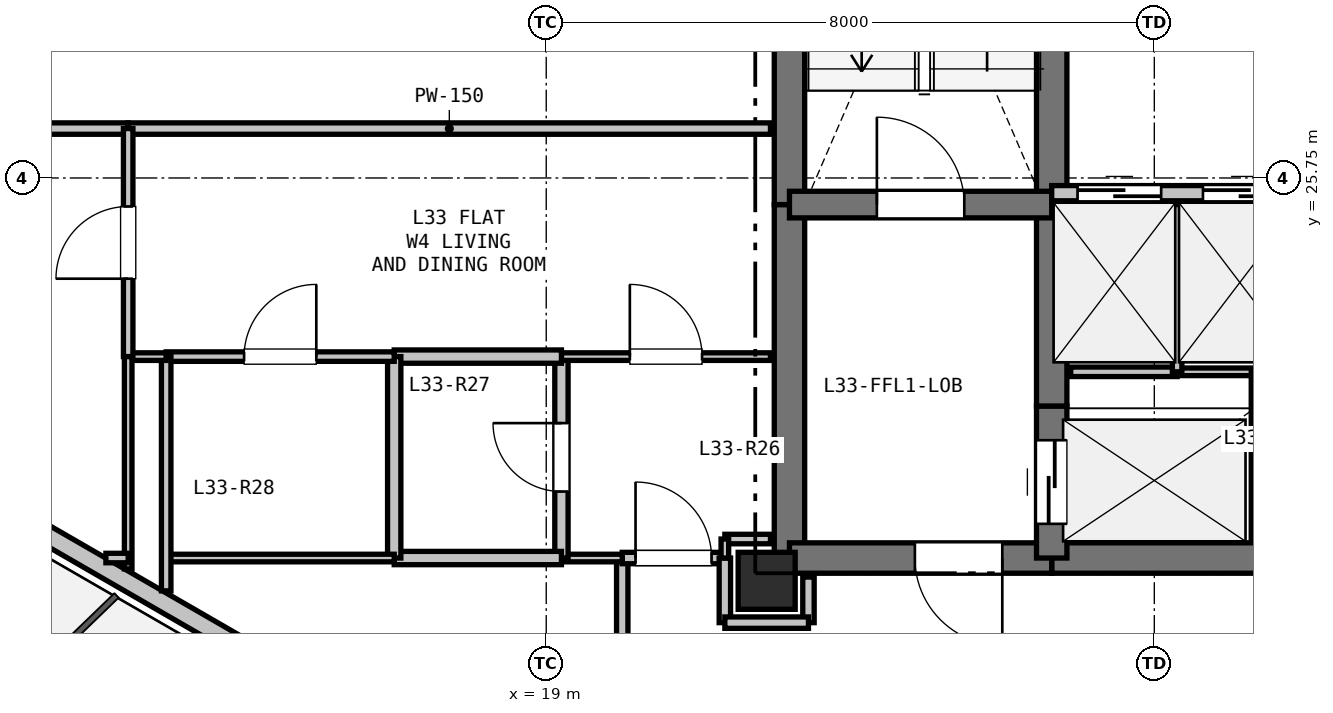
"""IFC4 building model, lengths in metres.
Left out: names, types, materials, properties, quantities, classifications, styles, units other than length and angle.
Written with IfcOpenShell. Run it as: python <this file> out.ifc"""

import sys

from ifc_helpers import new_model, si_unit, direction, frame, frame_2d, origin, origin_2d, place, context, subcontext, project, spatial, rectangle, extrude, element, fill, save


model = new_model("IFC4")
c1 = context("Model", 3, precision=1e-05, world=origin(), true_north=direction((0.0, 1.0)))
c2 = subcontext(c1, "Body", "Model", "MODEL_VIEW")
j1 = project(units=[si_unit("LENGTHUNIT", "METRE"), si_unit("PLANEANGLEUNIT", "RADIAN")], contexts=[c1])
p1 = place(None, origin())
s1 = spatial("IfcSite", under=j1, at=p1, CompositionType="ELEMENT")
p2 = place(p1, origin())
s2 = spatial("IfcBuilding", under=s1, at=p2, CompositionType="ELEMENT")
p3 = place(p2, frame((0.0, 0.0, 121.2)))
s3 = spatial("IfcBuildingStorey", under=s2, at=p3, CompositionType="ELEMENT", Elevation=121.2)
p4 = place(p3, frame((21.9, 20.45, 0.0), z_axis=(0.0, 0.0, 1.0), x_axis=(1.0, 0.0, 0.0)))
e1 = element("IfcColumn", 1, at=p4, inside=s3, PredefinedType="COLUMN", context=c2, shape_type="SweptSolid", body=[
    extrude(rectangle(XDim=0.75, YDim=0.75, at=origin_2d()), origin(), (0.0, 0.0, 1.0), 3.3),
])
p5 = place(p3, frame((16.378, 18.773, 0.0), z_axis=(0.0, 0.0, 1.0), x_axis=(-0.866027848477, 0.499995765644, 0.0)))
e2 = element("IfcWall", 2, at=p5, inside=s3, PredefinedType="SOLIDWALL", context=c2, shape_type="SweptSolid", body=[
    extrude(rectangle(XDim=11.186, YDim=0.25, at=frame_2d((5.593, 0.0))), origin(), (0.0, 0.0, 1.0), 2.68),
])
p6 = place(p5, frame((6.757, 0.0, 0.9)))
e3 = element("IfcOpeningElement", 3, at=p6, cuts=e2, PredefinedType="OPENING", context=c2, shape_type="SweptSolid", body=[
    extrude(rectangle(XDim=1.2, YDim=1.4, at=frame_2d((0.6, 0.7))), frame((0.0, 0.135, 0.0), z_axis=(0.0, -1.0, 0.0), x_axis=(1.0, 0.0, 0.0)), (0.0, 0.0, 1.0), 0.27),
])
p7 = place(p3, frame((22.2, 20.75, 0.0), z_axis=(0.0, 0.0, 1.0), x_axis=(0.0, 1.0, 0.0)))
e4 = element("IfcWall", 4, at=p7, inside=s3, PredefinedType="SHEAR", context=c2, shape_type="SweptSolid", body=[
    extrude(rectangle(XDim=4.65, YDim=0.4, at=frame_2d((2.325, 0.0))), origin(), (0.0, 0.0, 1.0), 3.06),
])
p8 = place(p3, frame((22.2, 25.4, 0.0), z_axis=(0.0, 0.0, 1.0), x_axis=(0.0, 1.0, 0.0)))
e5 = element("IfcWall", 5, at=p8, inside=s3, PredefinedType="SHEAR", context=c2, shape_type="SweptSolid", body=[
    extrude(rectangle(XDim=7.35, YDim=0.4, at=frame_2d((3.675, 0.0))), origin(), (0.0, 0.0, 1.0), 3.06),
])
p9 = place(p3, frame((28.35, 20.75, 0.0), z_axis=(0.0, 0.0, 1.0), x_axis=(-1.0, 0.0, 0.0)))
e6 = element("IfcWall", 6, at=p9, inside=s3, PredefinedType="SHEAR", context=c2, shape_type="SweptSolid", body=[
    extrude(rectangle(XDim=2.7, YDim=0.4, at=frame_2d((1.35, 0.0))), origin(), (0.0, 0.0, 1.0), 3.06),
])
p10 = place(p3, frame((25.65, 20.75, 0.0), z_axis=(0.0, 0.0, 1.0), x_axis=(-1.0, 0.0, 0.0)))
e7 = element("IfcWall", 7, at=p10, inside=s3, PredefinedType="SHEAR", context=c2, shape_type="SweptSolid", body=[
    extrude(rectangle(XDim=3.45, YDim=0.4, at=frame_2d((1.725, 0.0))), origin(), (0.0, 0.0, 1.0), 3.06),
])
p11 = place(p10, frame((0.65, 0.0, 0.0)))
e8 = element("IfcOpeningElement", 8, at=p11, cuts=e7, PredefinedType="OPENING", context=c2, shape_type="SweptSolid", body=[
    extrude(rectangle(XDim=1.15, YDim=2.15, at=frame_2d((0.575, 1.075))), frame((0.0, 0.21, 0.0), z_axis=(0.0, -1.0, 0.0), x_axis=(1.0, 0.0, 0.0)), (0.0, 0.0, 1.0), 0.42),
])
p12 = place(p3, frame((25.65, 20.75, 0.0), z_axis=(0.0, 0.0, 1.0), x_axis=(0.0, 1.0, 0.0)))
e9 = element("IfcWall", 9, at=p12, inside=s3, PredefinedType="SHEAR", context=c2, shape_type="SweptSolid", body=[
    extrude(rectangle(XDim=2.0, YDim=0.4, at=frame_2d((1.0, 0.0))), origin(), (0.0, 0.0, 1.0), 3.06),
])
p13 = place(p12, frame((0.45, 0.0, 0.0)))
e10 = element("IfcOpeningElement", 10, at=p13, cuts=e9, PredefinedType="OPENING", context=c2, shape_type="SweptSolid", body=[
    extrude(rectangle(XDim=1.1, YDim=2.15, at=frame_2d((0.55, 1.075))), frame((0.0, 0.21, 0.0), z_axis=(0.0, -1.0, 0.0), x_axis=(1.0, 0.0, 0.0)), (0.0, 0.0, 1.0), 0.42),
])
p14 = place(p3, frame((25.65, 22.75, 0.0), z_axis=(0.0, 0.0, 1.0), x_axis=(0.0, 1.0, 0.0)))
e11 = element("IfcWall", 11, at=p14, inside=s3, PredefinedType="SHEAR", context=c2, shape_type="SweptSolid", body=[
    extrude(rectangle(XDim=2.8, YDim=0.4, at=frame_2d((1.4, 0.0))), origin(), (0.0, 0.0, 1.0), 3.06),
])
p15 = place(p3, frame((25.65, 25.55, 0.0), z_axis=(0.0, 0.0, 1.0), x_axis=(0.0, 1.0, 0.0)))
e12 = element("IfcWall", 12, at=p15, inside=s3, PredefinedType="SHEAR", context=c2, shape_type="SweptSolid", body=[
    extrude(rectangle(XDim=2.4, YDim=0.4, at=frame_2d((1.2, 0.0))), origin(), (0.0, 0.0, 1.0), 3.06),
])
p16 = place(p3, frame((22.2, 25.4, 0.0), z_axis=(0.0, 0.0, 1.0), x_axis=(1.0, 0.0, 0.0)))
e13 = element("IfcWall", 13, at=p16, inside=s3, PredefinedType="SHEAR", context=c2, shape_type="SweptSolid", body=[
    extrude(rectangle(XDim=3.45, YDim=0.35, at=frame_2d((1.725, 0.0))), origin(), (0.0, 0.0, 1.0), 3.06),
])
p17 = place(p16, frame((1.15, 0.0, 0.0)))
e14 = element("IfcOpeningElement", 14, at=p17, cuts=e13, PredefinedType="OPENING", context=c2, shape_type="SweptSolid", body=[
    extrude(rectangle(XDim=1.15, YDim=2.15, at=frame_2d((0.575, 1.075))), frame((0.0, 0.185, 0.0), z_axis=(0.0, -1.0, 0.0), x_axis=(1.0, 0.0, 0.0)), (0.0, 0.0, 1.0), 0.37),
])
p18 = place(p3, frame((25.65, 25.55, 0.0), z_axis=(0.0, 0.0, 1.0), x_axis=(1.0, 0.0, 0.0)))
e15 = element("IfcWall", 15, at=p18, inside=s3, PredefinedType="PARTITIONING", context=c2, shape_type="SweptSolid", body=[
    extrude(rectangle(XDim=4.95, YDim=0.2, at=frame_2d((2.475, 0.0))), origin(), (0.0, 0.0, 1.0), 3.06),
])
p19 = place(p18, frame((0.34, 0.0, 0.0)))
e16 = element("IfcOpeningElement", 16, at=p19, cuts=e15, PredefinedType="OPENING", context=c2, shape_type="SweptSolid", body=[
    extrude(rectangle(XDim=1.1, YDim=2.15, at=frame_2d((0.55, 1.075))), frame((0.0, 0.11, 0.0), z_axis=(0.0, -1.0, 0.0), x_axis=(1.0, 0.0, 0.0)), (0.0, 0.0, 1.0), 0.22),
])
p20 = place(p18, frame((1.99, 0.0, 0.0)))
e17 = element("IfcOpeningElement", 17, at=p20, cuts=e15, PredefinedType="OPENING", context=c2, shape_type="SweptSolid", body=[
    extrude(rectangle(XDim=1.1, YDim=2.15, at=frame_2d((0.55, 1.075))), frame((0.0, 0.11, 0.0), z_axis=(0.0, -1.0, 0.0), x_axis=(1.0, 0.0, 0.0)), (0.0, 0.0, 1.0), 0.22),
])
p21 = place(p18, frame((3.64, 0.0, 0.0)))
e18 = element("IfcOpeningElement", 18, at=p21, cuts=e15, PredefinedType="OPENING", context=c2, shape_type="SweptSolid", body=[
    extrude(rectangle(XDim=1.1, YDim=2.15, at=frame_2d((0.55, 1.075))), frame((0.0, 0.11, 0.0), z_axis=(0.0, -1.0, 0.0), x_axis=(1.0, 0.0, 0.0)), (0.0, 0.0, 1.0), 0.22),
])
p22 = place(p3, frame((25.9, 23.2, 0.0), z_axis=(0.0, 0.0, 1.0), x_axis=(1.0, 0.0, 0.0)))
e19 = element("IfcWall", 19, at=p22, inside=s3, PredefinedType="PARTITIONING", context=c2, shape_type="SweptSolid", body=[
    extrude(rectangle(XDim=1.4, YDim=0.125, at=frame_2d((0.7, 0.0))), origin(), (0.0, 0.0, 1.0), 3.06),
])
p23 = place(p3, frame((27.3, 23.2, 0.0), z_axis=(0.0, 0.0, 1.0), x_axis=(1.0, 0.0, 0.0)))
e20 = element("IfcWall", 20, at=p23, inside=s3, PredefinedType="PARTITIONING", context=c2, shape_type="SweptSolid", body=[
    extrude(rectangle(XDim=1.05, YDim=0.1, at=frame_2d((0.525, 0.0))), origin(), (0.0, 0.0, 1.0), 3.06),
])
p24 = place(p3, frame((28.35, 23.2, 0.0), z_axis=(0.0, 0.0, 1.0), x_axis=(0.0, -1.0, 0.0)))
e21 = element("IfcWall", 21, at=p24, inside=s3, PredefinedType="PARTITIONING", context=c2, shape_type="SweptSolid", body=[
    extrude(rectangle(XDim=2.2, YDim=0.15, at=frame_2d((1.1, 0.0))), origin(), (0.0, 0.0, 1.0), 3.06),
])
p25 = place(p3, frame((27.3, 25.4, 0.0), z_axis=(0.0, 0.0, 1.0), x_axis=(0.0, -1.0, 0.0)))
e22 = element("IfcWall", 22, at=p25, inside=s3, PredefinedType="PARTITIONING", context=c2, shape_type="SweptSolid", body=[
    extrude(rectangle(XDim=2.2, YDim=0.125, at=frame_2d((1.1, 0.0))), origin(), (0.0, 0.0, 1.0), 3.06),
])
p26 = place(p3, frame((22.45, 19.9, 0.0), z_axis=(0.0, 0.0, 1.0), x_axis=(0.0, 1.0, 0.0)))
e23 = element("IfcWall", 23, at=p26, inside=s3, PredefinedType="PARTITIONING", context=c2, shape_type="SweptSolid", body=[
    extrude(rectangle(XDim=0.6, YDim=0.15, at=frame_2d((0.3, 0.0))), origin(), (0.0, 0.0, 1.0), 2.433),
])
p27 = place(p3, frame((20.0, 18.15, 0.0), z_axis=(0.0, 0.0, 1.0), x_axis=(0.0, 1.0, 0.0)))
e24 = element("IfcWall", 24, at=p27, inside=s3, PredefinedType="PARTITIONING", context=c2, shape_type="SweptSolid", body=[
    extrude(rectangle(XDim=2.6, YDim=0.15, at=frame_2d((1.3, 0.0))), origin(), (0.0, 0.0, 1.0), 3.06),
])
p28 = place(p3, frame((20.0, 20.75, 0.0), z_axis=(0.0, 0.0, 1.0), x_axis=(1.0, 0.0, 0.0)))
e25 = element("IfcWall", 25, at=p28, inside=s3, PredefinedType="PARTITIONING", context=c2, shape_type="SweptSolid", body=[
    extrude(rectangle(XDim=1.35, YDim=0.15, at=frame_2d((0.675, 0.0))), origin(), (0.0, 0.0, 1.0), 2.433),
])
p29 = place(p28, frame((0.175, 0.0, 0.0)))
e26 = element("IfcOpeningElement", 26, at=p29, cuts=e25, PredefinedType="OPENING", context=c2, shape_type="SweptSolid", body=[
    extrude(rectangle(XDim=1.0, YDim=2.15, at=frame_2d((0.5, 1.075))), frame((0.0, 0.085, 0.0), z_axis=(0.0, -1.0, 0.0), x_axis=(1.0, 0.0, 0.0)), (0.0, 0.0, 1.0), 0.17),
])
p30 = place(p3, frame((21.35, 20.75, 0.0), z_axis=(0.0, 0.0, 1.0), x_axis=(0.0, -1.0, 0.0)))
e27 = element("IfcWall", 27, at=p30, inside=s3, PredefinedType="PARTITIONING", context=c2, shape_type="SweptSolid", body=[
    extrude(rectangle(XDim=0.85, YDim=0.15, at=frame_2d((0.425, 0.0))), origin(), (0.0, 0.0, 1.0), 2.433),
])
p31 = place(p3, frame((21.35, 19.9, 0.0), z_axis=(0.0, 0.0, 1.0), x_axis=(1.0, 0.0, 0.0)))
e28 = element("IfcWall", 28, at=p31, inside=s3, PredefinedType="PARTITIONING", context=c2, shape_type="SweptSolid", body=[
    extrude(rectangle(XDim=1.1, YDim=0.15, at=frame_2d((0.55, 0.0))), origin(), (0.0, 0.0, 1.0), 2.433),
])
p32 = place(p3, frame((20.0, 20.75, 0.0), z_axis=(0.0, 0.0, 1.0), x_axis=(-1.0, 0.0, 0.0)))
e29 = element("IfcWall", 29, at=p32, inside=s3, PredefinedType="PARTITIONING", context=c2, shape_type="SweptSolid", body=[
    extrude(rectangle(XDim=0.8, YDim=0.1, at=frame_2d((0.4, 0.0))), origin(), (0.0, 0.0, 1.0), 3.06),
])
p33 = place(p3, frame((19.2, 20.75, 0.0), z_axis=(0.0, 0.0, 1.0), x_axis=(0.0, 1.0, 0.0)))
e30 = element("IfcWall", 30, at=p33, inside=s3, PredefinedType="PLUMBINGWALL", context=c2, shape_type="SweptSolid", body=[
    extrude(rectangle(XDim=2.65, YDim=0.175, at=frame_2d((1.325, 0.0))), origin(), (0.0, 0.0, 1.0), 2.433),
])
p34 = place(p33, frame((0.875, 0.0, 0.0)))
e31 = element("IfcOpeningElement", 31, at=p34, cuts=e30, PredefinedType="OPENING", context=c2, shape_type="SweptSolid", body=[
    extrude(rectangle(XDim=0.9, YDim=2.1, at=frame_2d((0.45, 1.05))), frame((0.0, 0.097, 0.0), z_axis=(0.0, -1.0, 0.0), x_axis=(1.0, 0.0, 0.0)), (0.0, 0.0, 1.0), 0.195),
])
p35 = place(p3, frame((19.2, 23.4, 0.0), z_axis=(0.0, 0.0, 1.0), x_axis=(1.0, 0.0, 0.0)))
e32 = element("IfcWall", 32, at=p35, inside=s3, PredefinedType="PARTITIONING", context=c2, shape_type="SweptSolid", body=[
    extrude(rectangle(XDim=2.75, YDim=0.1, at=frame_2d((1.375, 0.0))), origin(), (0.0, 0.0, 1.0), 2.508),
])
p36 = place(p35, frame((0.9, 0.0, 0.0)))
e33 = element("IfcOpeningElement", 33, at=p36, cuts=e32, PredefinedType="OPENING", context=c2, shape_type="SweptSolid", body=[
    extrude(rectangle(XDim=0.95, YDim=2.1, at=frame_2d((0.475, 1.05))), frame((0.0, 0.06, 0.0), z_axis=(0.0, -1.0, 0.0), x_axis=(1.0, 0.0, 0.0)), (0.0, 0.0, 1.0), 0.12),
])
p37 = place(p3, frame((21.95, 21.0, 0.0), z_axis=(0.0, 0.0, 1.0), x_axis=(-1.0, 0.0, 0.0)))
e34 = element("IfcWall", 34, at=p37, inside=s3, PredefinedType="PARTITIONING", context=c2, shape_type="SweptSolid", body=[
    extrude(rectangle(XDim=0.6, YDim=0.125, at=frame_2d((0.3, 0.0))), origin(), (0.0, 0.0, 1.0), 2.508),
])
p38 = place(p3, frame((21.35, 21.0, 0.0), z_axis=(0.0, 0.0, 1.0), x_axis=(0.0, -1.0, 0.0)))
e35 = element("IfcWall", 35, at=p38, inside=s3, PredefinedType="PARTITIONING", context=c2, shape_type="SweptSolid", body=[
    extrude(rectangle(XDim=0.25, YDim=0.1, at=frame_2d((0.125, 0.0))), origin(), (0.0, 0.0, 1.0), 3.06),
])
for number, where, z_axis, x_axis in (
    (36, (17.0, 23.4, 0.0), (0.0, 0.0, 1.0), (1.0, 0.0, 0.0)),
    (37, (19.2, 20.75, 0.0), (0.0, 0.0, 1.0), (-1.0, 0.0, 0.0)),
):
    element("IfcWall", number, at=place(p3, frame(where, z_axis=z_axis, x_axis=x_axis)), inside=s3, PredefinedType="PLUMBINGWALL", context=c2, shape_type="SweptSolid", body=[
        extrude(rectangle(XDim=2.2, YDim=0.175, at=frame_2d((1.1, 0.0))), origin(), (0.0, 0.0, 1.0), 3.06),
    ])
p39 = place(p3, frame((17.0, 20.75, 0.0), z_axis=(0.0, 0.0, 1.0), x_axis=(0.0, 1.0, 0.0)))
e38 = element("IfcWall", 38, at=p39, inside=s3, PredefinedType="PLUMBINGWALL", context=c2, shape_type="SweptSolid", body=[
    extrude(rectangle(XDim=2.65, YDim=0.175, at=frame_2d((1.325, 0.0))), origin(), (0.0, 0.0, 1.0), 2.433),
])
p40 = place(p3, frame((14.0, 23.4, 0.0), z_axis=(0.0, 0.0, 1.0), x_axis=(1.0, 0.0, 0.0)))
e39 = element("IfcWall", 39, at=p40, inside=s3, PredefinedType="PARTITIONING", context=c2, shape_type="SweptSolid", body=[
    extrude(rectangle(XDim=3.0, YDim=0.125, at=frame_2d((1.5, 0.0))), origin(), (0.0, 0.0, 1.0), 3.06),
])
p41 = place(p40, frame((1.025, 0.0, 0.0)))
e40 = element("IfcOpeningElement", 40, at=p41, cuts=e39, PredefinedType="OPENING", context=c2, shape_type="SweptSolid", body=[
    extrude(rectangle(XDim=0.95, YDim=2.1, at=frame_2d((0.475, 1.05))), frame((0.0, 0.073, 0.0), z_axis=(0.0, -1.0, 0.0), x_axis=(1.0, 0.0, 0.0)), (0.0, 0.0, 1.0), 0.145),
])
p42 = place(p3, frame((17.0, 20.75, 0.0), z_axis=(0.0, 0.0, 1.0), x_axis=(-1.0, 0.0, 0.0)))
e41 = element("IfcWall", 41, at=p42, inside=s3, PredefinedType="PARTITIONING", context=c2, shape_type="SweptSolid", body=[
    extrude(rectangle(XDim=3.0, YDim=0.1, at=frame_2d((1.5, 0.0))), origin(), (0.0, 0.0, 1.0), 2.365),
])
p43 = place(p3, frame((14.0, 20.318, 0.0), z_axis=(0.0, 0.0, 1.0), x_axis=(0.0, 1.0, 0.0)))
e42 = element("IfcWall", 42, at=p43, inside=s3, PredefinedType="PARTITIONING", context=c2, shape_type="SweptSolid", body=[
    extrude(rectangle(XDim=3.082, YDim=0.125, at=frame_2d((1.541, 0.0))), origin(), (0.0, 0.0, 1.0), 2.365),
])
p44 = place(p3, frame((21.95, 26.4, 0.0), z_axis=(0.0, 0.0, 1.0), x_axis=(-1.0, 0.0, 0.0)))
e43 = element("IfcWall", 43, at=p44, inside=s3, PredefinedType="PARTITIONING", context=c2, shape_type="SweptSolid", body=[
    extrude(rectangle(XDim=8.45, YDim=0.15, at=frame_2d((4.225, 0.0))), origin(), (0.0, 0.0, 1.0), 2.508),
])
p45 = place(p3, frame((13.5, 26.4, 0.0), z_axis=(0.0, 0.0, 1.0), x_axis=(-1.0, 0.0, 0.0)))
e44 = element("IfcWall", 44, at=p45, inside=s3, PredefinedType="PARTITIONING", context=c2, shape_type="SweptSolid", body=[
    extrude(rectangle(XDim=6.791, YDim=0.15, at=frame_2d((3.396, 0.0))), origin(), (0.0, 0.0, 1.0), 2.725),
])
p46 = place(p3, frame((14.0, 23.4, 0.0), z_axis=(0.0, 0.0, 1.0), x_axis=(-1.0, 0.0, 0.0)))
e45 = element("IfcWall", 45, at=p46, inside=s3, PredefinedType="PARTITIONING", context=c2, shape_type="SweptSolid", body=[
    extrude(rectangle(XDim=0.5, YDim=0.1, at=frame_2d((0.25, 0.0))), origin(), (0.0, 0.0, 1.0), 3.06),
])
p47 = place(p3, frame((13.5, 23.4, 0.0), z_axis=(0.0, 0.0, 1.0), x_axis=(0.0, 1.0, 0.0)))
e46 = element("IfcWall", 46, at=p47, inside=s3, PredefinedType="PARTITIONING", context=c2, shape_type="SweptSolid", body=[
    extrude(rectangle(XDim=3.0, YDim=0.125, at=frame_2d((1.5, 0.0))), origin(), (0.0, 0.0, 1.0), 3.06),
])
p48 = place(p47, frame((1.025, 0.0, 0.0)))
e47 = element("IfcOpeningElement", 47, at=p48, cuts=e46, PredefinedType="OPENING", context=c2, shape_type="SweptSolid", body=[
    extrude(rectangle(XDim=0.95, YDim=2.1, at=frame_2d((0.475, 1.05))), frame((0.0, 0.073, 0.0), z_axis=(0.0, -1.0, 0.0), x_axis=(1.0, 0.0, 0.0)), (0.0, 0.0, 1.0), 0.145),
])
p49 = place(p3, frame((13.5, 23.4, 0.0), z_axis=(0.0, 0.0, 1.0), x_axis=(0.0, -1.0, 0.0)))
e48 = element("IfcWall", 48, at=p49, inside=s3, PredefinedType="PARTITIONING", context=c2, shape_type="SweptSolid", body=[
    extrude(rectangle(XDim=2.793, YDim=0.1, at=frame_2d((1.396, 0.0))), origin(), (0.0, 0.0, 1.0), 2.365),
])
p50 = place(p3, frame((13.5, 20.75, 0.0), z_axis=(0.0, 0.0, 1.0), x_axis=(-1.0, 0.0, 0.0)))
e49 = element("IfcWall", 49, at=p50, inside=s3, PredefinedType="PARTITIONING", context=c2, shape_type="SweptSolid", body=[
    extrude(rectangle(XDim=0.293, YDim=0.125, at=frame_2d((0.146, 0.0))), origin(), (0.0, 0.0, 1.0), 3.06),
])
p51 = place(p19, origin())
e50 = element("IfcDoor", 50, at=p51, inside=s3, OperationType="SLIDING_TO_LEFT", PredefinedType="DOOR", context=c2, shape_type="SweptSolid", body=[
    extrude(rectangle(XDim=1.1, YDim=2.15, at=frame_2d((0.55, 1.075))), frame((0.0, 0.025, 0.0), z_axis=(0.0, -1.0, 0.0), x_axis=(1.0, 0.0, 0.0)), (0.0, 0.0, 1.0), 0.05),
])
fill(e16, e50)
p52 = place(p20, origin())
e51 = element("IfcDoor", 51, at=p52, inside=s3, OperationType="SLIDING_TO_LEFT", PredefinedType="DOOR", context=c2, shape_type="SweptSolid", body=[
    extrude(rectangle(XDim=1.1, YDim=2.15, at=frame_2d((0.55, 1.075))), frame((0.0, 0.025, 0.0), z_axis=(0.0, -1.0, 0.0), x_axis=(1.0, 0.0, 0.0)), (0.0, 0.0, 1.0), 0.05),
])
fill(e17, e51)
p53 = place(p13, origin())
e52 = element("IfcDoor", 52, at=p53, inside=s3, OperationType="SLIDING_TO_LEFT", PredefinedType="DOOR", context=c2, shape_type="SweptSolid", body=[
    extrude(rectangle(XDim=1.1, YDim=2.15, at=frame_2d((0.55, 1.075))), frame((0.0, 0.025, 0.0), z_axis=(0.0, -1.0, 0.0), x_axis=(1.0, 0.0, 0.0)), (0.0, 0.0, 1.0), 0.05),
])
fill(e10, e52)
p54 = place(p17, origin())
e53 = element("IfcDoor", 53, at=p54, inside=s3, OperationType="SINGLE_SWING_LEFT", PredefinedType="DOOR", context=c2, shape_type="SweptSolid", body=[
    extrude(rectangle(XDim=1.15, YDim=2.15, at=frame_2d((0.575, 1.075))), frame((0.0, 0.025, 0.0), z_axis=(0.0, -1.0, 0.0), x_axis=(1.0, 0.0, 0.0)), (0.0, 0.0, 1.0), 0.05),
])
fill(e14, e53)
p55 = place(p11, origin())
e54 = element("IfcDoor", 54, at=p55, inside=s3, OperationType="SINGLE_SWING_LEFT", PredefinedType="DOOR", context=c2, shape_type="SweptSolid", body=[
    extrude(rectangle(XDim=1.15, YDim=2.15, at=frame_2d((0.575, 1.075))), frame((0.0, 0.025, 0.0), z_axis=(0.0, -1.0, 0.0), x_axis=(1.0, 0.0, 0.0)), (0.0, 0.0, 1.0), 0.05),
])
fill(e8, e54)
p56 = place(p29, origin())
e55 = element("IfcDoor", 55, at=p56, inside=s3, OperationType="SINGLE_SWING_LEFT", PredefinedType="DOOR", context=c2, shape_type="SweptSolid", body=[
    extrude(rectangle(XDim=1.0, YDim=2.15, at=frame_2d((0.5, 1.075))), frame((0.0, 0.025, 0.0), z_axis=(0.0, -1.0, 0.0), x_axis=(1.0, 0.0, 0.0)), (0.0, 0.0, 1.0), 0.05),
])
fill(e26, e55)
p57 = place(p34, origin())
e56 = element("IfcDoor", 56, at=p57, inside=s3, OperationType="SINGLE_SWING_RIGHT", PredefinedType="DOOR", context=c2, shape_type="SweptSolid", body=[
    extrude(rectangle(XDim=0.9, YDim=2.1, at=frame_2d((0.45, 1.05))), frame((0.0, 0.025, 0.0), z_axis=(0.0, -1.0, 0.0), x_axis=(1.0, 0.0, 0.0)), (0.0, 0.0, 1.0), 0.05),
])
fill(e31, e56)
p58 = place(p36, origin())
e57 = element("IfcDoor", 57, at=p58, inside=s3, OperationType="SINGLE_SWING_LEFT", PredefinedType="DOOR", context=c2, shape_type="SweptSolid", body=[
    extrude(rectangle(XDim=0.95, YDim=2.1, at=frame_2d((0.475, 1.05))), frame((0.0, 0.025, 0.0), z_axis=(0.0, -1.0, 0.0), x_axis=(1.0, 0.0, 0.0)), (0.0, 0.0, 1.0), 0.05),
])
fill(e33, e57)
p59 = place(p41, origin())
e58 = element("IfcDoor", 58, at=p59, inside=s3, OperationType="SINGLE_SWING_RIGHT", PredefinedType="DOOR", context=c2, shape_type="SweptSolid", body=[
    extrude(rectangle(XDim=0.95, YDim=2.1, at=frame_2d((0.475, 1.05))), frame((0.0, 0.025, 0.0), z_axis=(0.0, -1.0, 0.0), x_axis=(1.0, 0.0, 0.0)), (0.0, 0.0, 1.0), 0.05),
])
fill(e40, e58)
p60 = place(p48, origin())
e59 = element("IfcDoor", 59, at=p60, inside=s3, OperationType="SINGLE_SWING_LEFT", PredefinedType="DOOR", context=c2, shape_type="SweptSolid", body=[
    extrude(rectangle(XDim=0.95, YDim=2.1, at=frame_2d((0.475, 1.05))), frame((0.0, 0.025, 0.0), z_axis=(0.0, -1.0, 0.0), x_axis=(1.0, 0.0, 0.0)), (0.0, 0.0, 1.0), 0.05),
])
fill(e47, e59)
save(model, sys.argv[1])
